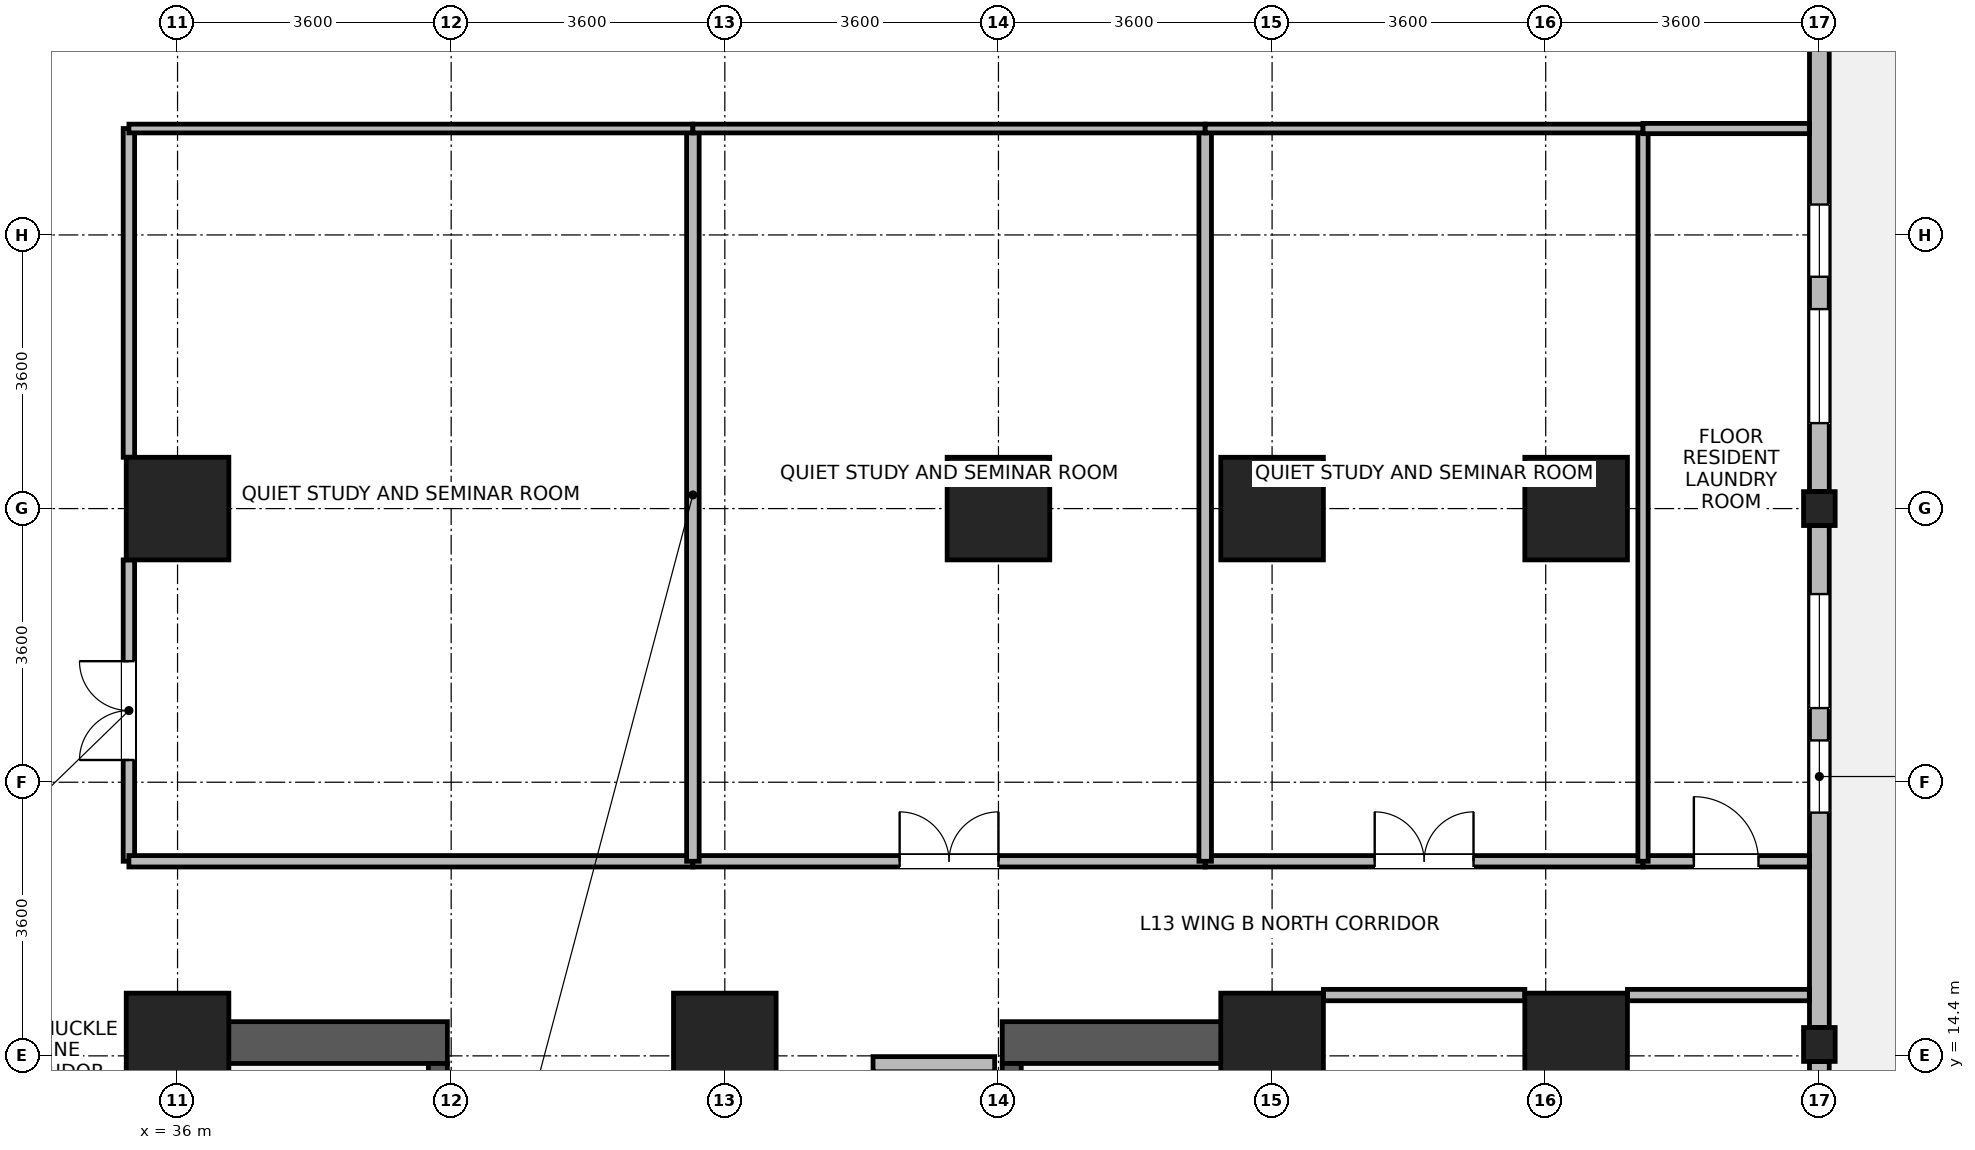
"""IFC4 building model, lengths in metres.
Left out: names, types, materials, properties, quantities, classifications, styles, units other than length and angle.
Written with IfcOpenShell. Run it as: python <this file> out.ifc"""

import sys

from ifc_helpers import new_model, si_unit, direction, frame, frame_2d, origin, origin_2d, place, context, subcontext, project, spatial, rectangle, i_section, extrude, source, transform, mapped, element, fill, save


model = new_model("IFC4")
c1 = context("Model", 3, precision=1e-05, world=origin(), true_north=direction((0.0, 1.0)))
c2 = subcontext(c1, "Body", "Model", "MODEL_VIEW")
j1 = project(units=[si_unit("LENGTHUNIT", "METRE"), si_unit("PLANEANGLEUNIT", "RADIAN")], contexts=[c1])
p1 = place(None, origin())
s1 = spatial("IfcSite", under=j1, at=p1, CompositionType="ELEMENT")
p2 = place(p1, origin())
s2 = spatial("IfcBuilding", under=s1, at=p2, CompositionType="ELEMENT")
p3 = place(p2, frame((0.0, 0.0, 54.9)))
s3 = spatial("IfcBuildingStorey", under=s2, at=p3, CompositionType="ELEMENT", Elevation=54.9)
for number, where, z_axis, x_axis in (
    (1, (36.075, 6.75, 0.0), (0.0, 0.0, 1.0), (0.0, 1.0, 0.0)),
    (2, (50.325, 6.75, 0.0), (0.0, 0.0, 1.0), (0.0, 1.0, 0.0)),
):
    element("IfcWall", number, at=place(p3, frame(where, z_axis=z_axis, x_axis=x_axis)), inside=s3, PredefinedType="SHEAR", context=c2, shape_type="SweptSolid", body=[
        extrude(rectangle(XDim=8.1, YDim=0.55, at=frame_2d((4.05, 0.0))), origin(), (0.0, 0.0, 1.0), 3.45),
    ])
for number, where, z_axis, x_axis in (
    (3, (36.35, 14.575, 0.0), (0.0, 0.0, 1.0), (1.0, 0.0, 0.0)),
    (4, (46.85, 14.575, 0.0), (0.0, 0.0, 1.0), (1.0, 0.0, 0.0)),
):
    element("IfcWall", number, at=place(p3, frame(where, z_axis=z_axis, x_axis=x_axis)), inside=s3, PredefinedType="SHEAR", context=c2, shape_type="SweptSolid", body=[
        extrude(rectangle(XDim=3.2, YDim=0.55, at=frame_2d((1.6, 0.0))), origin(), (0.0, 0.0, 1.0), 3.45),
    ])
p4 = place(p3, frame((39.425, 7.3, 0.0), z_axis=(0.0, 0.0, 1.0), x_axis=(0.0, 1.0, 0.0)))
e5 = element("IfcWall", 5, at=p4, inside=s3, PredefinedType="SHEAR", context=c2, shape_type="SweptSolid", body=[
    extrude(rectangle(XDim=7.0, YDim=0.25, at=frame_2d((3.5, 0.0))), origin(), (0.0, 0.0, 1.0), 3.45),
])
p5 = place(p4, frame((0.15, 0.0, 0.0)))
e6 = element("IfcOpeningElement", 6, at=p5, cuts=e5, PredefinedType="OPENING", context=c2, shape_type="SweptSolid", body=[
    extrude(rectangle(XDim=1.1, YDim=2.08, at=frame_2d((0.55, 1.04))), frame((0.0, 0.135, 0.0), z_axis=(0.0, -1.0, 0.0), x_axis=(1.0, 0.0, 0.0)), (0.0, 0.0, 1.0), 0.27),
])
p6 = place(p3, frame((46.975, 7.3, 0.0), z_axis=(0.0, 0.0, 1.0), x_axis=(0.0, 1.0, 0.0)))
e7 = element("IfcWall", 7, at=p6, inside=s3, PredefinedType="SHEAR", context=c2, shape_type="SweptSolid", body=[
    extrude(rectangle(XDim=7.0, YDim=0.25, at=frame_2d((3.5, 0.0))), origin(), (0.0, 0.0, 1.0), 3.45),
])
p7 = place(p6, frame((0.15, 0.0, 0.0)))
e8 = element("IfcOpeningElement", 8, at=p7, cuts=e7, PredefinedType="OPENING", context=c2, shape_type="SweptSolid", body=[
    extrude(rectangle(XDim=1.1, YDim=2.08, at=frame_2d((0.55, 1.04))), frame((0.0, 0.135, 0.0), z_axis=(0.0, -1.0, 0.0), x_axis=(1.0, 0.0, 0.0)), (0.0, 0.0, 1.0), 0.27),
])
m1 = source(origin(), c2, "Body", "SweptSolid", [
    extrude(rectangle(XDim=1.35, YDim=1.35, at=origin_2d()), origin(), (0.0, 0.0, 1.0), 3.7),
])
for number, where, z_axis, x_axis in (
    (9, (36.0, 21.6, 0.0), (0.0, 0.0, 1.0), (1.0, 0.0, 0.0)),
    (10, (46.8, 21.6, 0.0), (0.0, 0.0, 1.0), (1.0, 0.0, 0.0)),
    (11, (36.0, 14.55, 0.0), (0.0, 0.0, 1.0), (1.0, 0.0, 0.0)),
    (12, (43.2, 14.55, 0.0), (0.0, 0.0, 1.0), (1.0, 0.0, 0.0)),
    (13, (50.4, 14.55, 0.0), (0.0, 0.0, 1.0), (1.0, 0.0, 0.0)),
    (14, (50.4, 21.6, 0.0), (0.0, 0.0, 1.0), (1.0, 0.0, 0.0)),
    (15, (54.4, 14.55, 0.0), (0.0, 0.0, 1.0), (1.0, 0.0, 0.0)),
    (16, (54.4, 21.6, 0.0), (0.0, 0.0, 1.0), (1.0, 0.0, 0.0)),
):
    element("IfcColumn", number, at=place(p3, frame(where, z_axis=z_axis, x_axis=x_axis)), inside=s3, PredefinedType="COLUMN", context=c2, shape_type="MappedRepresentation", body=[
        mapped(m1, transform((0.0, 0.0, 0.0), x_axis=(1.0, 0.0, 0.0), y_axis=(0.0, 1.0, 0.0), z_axis=(0.0, 0.0, 1.0), scale=1.0)),
    ])
m2 = source(origin(), c2, "Body", "SweptSolid", [
    extrude(i_section(OverallWidth=0.416, OverallDepth=0.446, WebThickness=0.029, FlangeThickness=0.04, FilletRadius=0.015, at=origin_2d()), origin(), (0.0, 0.0, 1.0), 3.7),
])
for number, where, z_axis, x_axis in (
    (17, (57.6, 14.55, 0.0), (0.0, 0.0, 1.0), (1.0, 0.0, 0.0)),
    (18, (57.6, 21.6, 0.0), (0.0, 0.0, 1.0), (1.0, 0.0, 0.0)),
):
    element("IfcColumn", number, at=place(p3, frame(where, z_axis=z_axis, x_axis=x_axis)), inside=s3, PredefinedType="COLUMN", context=c2, shape_type="MappedRepresentation", body=[
        mapped(m2, transform((0.0, 0.0, 0.0), x_axis=(1.0, 0.0, 0.0), y_axis=(0.0, 1.0, 0.0), z_axis=(0.0, 0.0, 1.0), scale=1.0)),
    ])
p8 = place(p3, frame((57.6, 14.326, 0.0), z_axis=(0.0, 0.0, 1.0), x_axis=(0.0, -1.0, 0.0)))
e19 = element("IfcWall", 19, at=p8, inside=s3, PredefinedType="STANDARD", context=c2, shape_type="SweptSolid", body=[
    extrude(rectangle(XDim=7.052, YDim=0.26, at=frame_2d((3.526, 0.0))), origin(), (0.0, 0.0, 1.0), 2.93),
])
p9 = place(p8, frame((2.776, 0.0, 0.0)))
e20 = element("IfcOpeningElement", 20, at=p9, cuts=e19, PredefinedType="OPENING", context=c2, shape_type="SweptSolid", body=[
    extrude(rectangle(XDim=1.5, YDim=2.15, at=frame_2d((0.75, 1.075))), frame((0.0, 0.14, 0.0), z_axis=(0.0, -1.0, 0.0), x_axis=(1.0, 0.0, 0.0)), (0.0, 0.0, 1.0), 0.28),
])
p10 = place(p8, frame((1.013, 0.0, 0.85)))
e21 = element("IfcOpeningElement", 21, at=p10, cuts=e19, PredefinedType="OPENING", context=c2, shape_type="SweptSolid", body=[
    extrude(rectangle(XDim=1.5, YDim=1.85, at=frame_2d((0.75, 0.925))), frame((0.0, 0.14, 0.0), z_axis=(0.0, -1.0, 0.0), x_axis=(1.0, 0.0, 0.0)), (0.0, 0.0, 1.0), 0.28),
])
p11 = place(p8, frame((4.539, 0.0, 0.85)))
e22 = element("IfcOpeningElement", 22, at=p11, cuts=e19, PredefinedType="OPENING", context=c2, shape_type="SweptSolid", body=[
    extrude(rectangle(XDim=1.5, YDim=1.85, at=frame_2d((0.75, 0.925))), frame((0.0, 0.14, 0.0), z_axis=(0.0, -1.0, 0.0), x_axis=(1.0, 0.0, 0.0)), (0.0, 0.0, 1.0), 0.28),
])
p12 = place(p3, frame((57.6, 21.376, 0.0), z_axis=(0.0, 0.0, 1.0), x_axis=(0.0, -1.0, 0.0)))
e23 = element("IfcWall", 23, at=p12, inside=s3, PredefinedType="STANDARD", context=c2, shape_type="SweptSolid", body=[
    extrude(rectangle(XDim=6.602, YDim=0.26, at=frame_2d((3.301, 0.0))), origin(), (0.0, 0.0, 1.0), 2.93),
])
p13 = place(p12, frame((0.9, 0.0, 0.85)))
e24 = element("IfcOpeningElement", 24, at=p13, cuts=e23, PredefinedType="OPENING", context=c2, shape_type="SweptSolid", body=[
    extrude(rectangle(XDim=1.5, YDim=1.85, at=frame_2d((0.75, 0.925))), frame((0.0, 0.14, 0.0), z_axis=(0.0, -1.0, 0.0), x_axis=(1.0, 0.0, 0.0)), (0.0, 0.0, 1.0), 0.28),
])
p14 = place(p12, frame((2.826, 0.0, 0.85)))
e25 = element("IfcOpeningElement", 25, at=p14, cuts=e23, PredefinedType="OPENING", context=c2, shape_type="SweptSolid", body=[
    extrude(rectangle(XDim=0.95, YDim=1.75, at=frame_2d((0.475, 0.875))), frame((0.0, 0.14, 0.0), z_axis=(0.0, -1.0, 0.0), x_axis=(1.0, 0.0, 0.0)), (0.0, 0.0, 1.0), 0.28),
])
p15 = place(p3, frame((57.6, 28.426, 0.0), z_axis=(0.0, 0.0, 1.0), x_axis=(0.0, -1.0, 0.0)))
e26 = element("IfcWall", 26, at=p15, inside=s3, PredefinedType="STANDARD", context=c2, shape_type="SweptSolid", body=[
    extrude(rectangle(XDim=6.602, YDim=0.26, at=frame_2d((3.301, 0.0))), origin(), (0.0, 0.0, 1.0), 2.93),
])
p16 = place(p15, frame((4.201, 0.0, 0.85)))
e27 = element("IfcOpeningElement", 27, at=p16, cuts=e26, PredefinedType="OPENING", context=c2, shape_type="SweptSolid", body=[
    extrude(rectangle(XDim=1.5, YDim=1.85, at=frame_2d((0.75, 0.925))), frame((0.0, 0.14, 0.0), z_axis=(0.0, -1.0, 0.0), x_axis=(1.0, 0.0, 0.0)), (0.0, 0.0, 1.0), 0.28),
])
p17 = place(p15, frame((2.826, 0.0, 0.85)))
e28 = element("IfcOpeningElement", 28, at=p17, cuts=e26, PredefinedType="OPENING", context=c2, shape_type="SweptSolid", body=[
    extrude(rectangle(XDim=0.95, YDim=1.75, at=frame_2d((0.475, 0.875))), frame((0.0, 0.14, 0.0), z_axis=(0.0, -1.0, 0.0), x_axis=(1.0, 0.0, 0.0)), (0.0, 0.0, 1.0), 0.28),
])
p18 = place(p3, frame((45.15, 14.29, 0.0), z_axis=(0.0, 0.0, 1.0), x_axis=(1.0, 0.0, 0.0)))
e29 = element("IfcWall", 29, at=p18, inside=s3, PredefinedType="PARTITIONING", context=c2, shape_type="SweptSolid", body=[
    extrude(rectangle(XDim=1.6, YDim=0.2, at=frame_2d((0.8, 0.0))), origin(), (0.0, 0.0, 1.0), 2.23),
])
p19 = place(p3, frame((35.36, 16.96, 0.0), z_axis=(0.0, 0.0, 1.0), x_axis=(0.0, 1.0, 0.0)))
e30 = element("IfcWall", 30, at=p19, inside=s3, PredefinedType="PARTITIONING", context=c2, shape_type="SweptSolid", body=[
    extrude(rectangle(XDim=3.965, YDim=0.15, at=frame_2d((1.982, 0.0))), origin(), (0.0, 0.0, 1.0), 3.43),
])
p20 = place(p19, frame((1.333, 0.0, 0.0)))
e31 = element("IfcOpeningElement", 31, at=p20, cuts=e30, PredefinedType="OPENING", context=c2, shape_type="SweptSolid", body=[
    extrude(rectangle(XDim=1.3, YDim=2.12, at=frame_2d((0.65, 1.06))), frame((0.0, 0.085, 0.0), z_axis=(0.0, -1.0, 0.0), x_axis=(1.0, 0.0, 0.0)), (0.0, 0.0, 1.0), 0.17),
])
p21 = place(p3, frame((35.36, 22.275, 0.0), z_axis=(0.0, 0.0, 1.0), x_axis=(0.0, 1.0, 0.0)))
e32 = element("IfcWall", 32, at=p21, inside=s3, PredefinedType="PARTITIONING", context=c2, shape_type="SweptSolid", body=[
    extrude(rectangle(XDim=4.325, YDim=0.15, at=frame_2d((2.163, 0.0))), origin(), (0.0, 0.0, 1.0), 3.43),
])
p22 = place(p3, frame((35.36, 16.96, 0.0), z_axis=(0.0, 0.0, 1.0), x_axis=(1.0, 0.0, 0.0)))
e33 = element("IfcWall", 33, at=p22, inside=s3, PredefinedType="PARTITIONING", context=c2, shape_type="SweptSolid", body=[
    extrude(rectangle(XDim=7.42, YDim=0.15, at=frame_2d((3.71, 0.0))), origin(), (0.0, 0.0, 1.0), 3.43),
])
p23 = place(p3, frame((51.075, 15.2, 0.0), z_axis=(0.0, 0.0, 1.0), x_axis=(1.0, 0.0, 0.0)))
e34 = element("IfcWall", 34, at=p23, inside=s3, PredefinedType="PARTITIONING", context=c2, shape_type="SweptSolid", body=[
    extrude(rectangle(XDim=2.65, YDim=0.15, at=frame_2d((1.325, 0.0))), origin(), (0.0, 0.0, 1.0), 3.43),
])
p24 = place(p3, frame((55.075, 15.2, 0.0), z_axis=(0.0, 0.0, 1.0), x_axis=(1.0, 0.0, 0.0)))
e35 = element("IfcWall", 35, at=p24, inside=s3, PredefinedType="PARTITIONING", context=c2, shape_type="SweptSolid", body=[
    extrude(rectangle(XDim=2.393, YDim=0.15, at=frame_2d((1.197, 0.0))), origin(), (0.0, 0.0, 1.0), 3.43),
])
p25 = place(p3, frame((42.78, 16.96, 0.0), z_axis=(0.0, 0.0, 1.0), x_axis=(1.0, 0.0, 0.0)))
e36 = element("IfcWall", 36, at=p25, inside=s3, PredefinedType="PARTITIONING", context=c2, shape_type="SweptSolid", body=[
    extrude(rectangle(XDim=6.74, YDim=0.15, at=frame_2d((3.37, 0.0))), origin(), (0.0, 0.0, 1.0), 3.43),
])
p26 = place(p25, frame((2.72, 0.0, 0.0)))
e37 = element("IfcOpeningElement", 37, at=p26, cuts=e36, PredefinedType="OPENING", context=c2, shape_type="SweptSolid", body=[
    extrude(rectangle(XDim=1.3, YDim=2.12, at=frame_2d((0.65, 1.06))), frame((0.0, 0.085, 0.0), z_axis=(0.0, -1.0, 0.0), x_axis=(1.0, 0.0, 0.0)), (0.0, 0.0, 1.0), 0.17),
])
p27 = place(p3, frame((49.52, 16.96, 0.0), z_axis=(0.0, 0.0, 1.0), x_axis=(1.0, 0.0, 0.0)))
e38 = element("IfcWall", 38, at=p27, inside=s3, PredefinedType="PARTITIONING", context=c2, shape_type="SweptSolid", body=[
    extrude(rectangle(XDim=5.76, YDim=0.15, at=frame_2d((2.88, 0.0))), origin(), (0.0, 0.0, 1.0), 3.43),
])
p28 = place(p27, frame((2.23, 0.0, 0.0)))
e39 = element("IfcOpeningElement", 39, at=p28, cuts=e38, PredefinedType="OPENING", context=c2, shape_type="SweptSolid", body=[
    extrude(rectangle(XDim=1.3, YDim=2.12, at=frame_2d((0.65, 1.06))), frame((0.0, 0.085, 0.0), z_axis=(0.0, -1.0, 0.0), x_axis=(1.0, 0.0, 0.0)), (0.0, 0.0, 1.0), 0.17),
])
p29 = place(p3, frame((55.28, 16.96, 0.0), z_axis=(0.0, 0.0, 1.0), x_axis=(1.0, 0.0, 0.0)))
e40 = element("IfcWall", 40, at=p29, inside=s3, PredefinedType="PARTITIONING", context=c2, shape_type="SweptSolid", body=[
    extrude(rectangle(XDim=2.188, YDim=0.15, at=frame_2d((1.094, 0.0))), origin(), (0.0, 0.0, 1.0), 3.43),
])
p30 = place(p29, frame((0.669, 0.0, 0.0)))
e41 = element("IfcOpeningElement", 41, at=p30, cuts=e40, PredefinedType="OPENING", context=c2, shape_type="SweptSolid", body=[
    extrude(rectangle(XDim=0.85, YDim=2.04, at=frame_2d((0.425, 1.02))), frame((0.0, 0.085, 0.0), z_axis=(0.0, -1.0, 0.0), x_axis=(1.0, 0.0, 0.0)), (0.0, 0.0, 1.0), 0.17),
])
for number, where, z_axis, x_axis in (
    (42, (42.78, 16.96, 0.0), (0.0, 0.0, 1.0), (0.0, 1.0, 0.0)),
    (43, (49.52, 16.96, 0.0), (0.0, 0.0, 1.0), (0.0, 1.0, 0.0)),
):
    element("IfcWall", number, at=place(p3, frame(where, z_axis=z_axis, x_axis=x_axis)), inside=s3, PredefinedType="PARTITIONING", context=c2, shape_type="SweptSolid", body=[
        extrude(rectangle(XDim=9.64, YDim=0.165, at=frame_2d((4.82, 0.0))), origin(), (0.0, 0.0, 1.0), 3.43),
    ])
p31 = place(p3, frame((55.28, 16.96, 0.0), z_axis=(0.0, 0.0, 1.0), x_axis=(0.0, 1.0, 0.0)))
e44 = element("IfcWall", 44, at=p31, inside=s3, PredefinedType="PARTITIONING", context=c2, shape_type="SweptSolid", body=[
    extrude(rectangle(XDim=9.64, YDim=0.135, at=frame_2d((4.82, 0.0))), origin(), (0.0, 0.0, 1.0), 3.43),
])
p32 = place(p3, frame((35.36, 26.6, 0.0), z_axis=(0.0, 0.0, 1.0), x_axis=(1.0, 0.0, 0.0)))
e45 = element("IfcWall", 45, at=p32, inside=s3, PredefinedType="PARTITIONING", context=c2, shape_type="SweptSolid", body=[
    extrude(rectangle(XDim=7.42, YDim=0.115, at=frame_2d((3.71, 0.0))), origin(), (0.0, 0.0, 1.0), 3.43),
])
p33 = place(p3, frame((42.78, 26.6, 0.0), z_axis=(0.0, 0.0, 1.0), x_axis=(1.0, 0.0, 0.0)))
e46 = element("IfcWall", 46, at=p33, inside=s3, PredefinedType="PARTITIONING", context=c2, shape_type="SweptSolid", body=[
    extrude(rectangle(XDim=6.74, YDim=0.115, at=frame_2d((3.37, 0.0))), origin(), (0.0, 0.0, 1.0), 3.43),
])
p34 = place(p3, frame((49.52, 26.6, 0.0), z_axis=(0.0, 0.0, 1.0), x_axis=(1.0, 0.0, 0.0)))
e47 = element("IfcWall", 47, at=p34, inside=s3, PredefinedType="PARTITIONING", context=c2, shape_type="SweptSolid", body=[
    extrude(rectangle(XDim=5.76, YDim=0.115, at=frame_2d((2.88, 0.0))), origin(), (0.0, 0.0, 1.0), 3.43),
])
p35 = place(p3, frame((55.28, 26.6, 0.0), z_axis=(0.0, 0.0, 1.0), x_axis=(1.0, 0.0, 0.0)))
e48 = element("IfcWall", 48, at=p35, inside=s3, PredefinedType="PARTITIONING", context=c2, shape_type="SweptSolid", body=[
    extrude(rectangle(XDim=2.188, YDim=0.135, at=frame_2d((1.094, 0.0))), origin(), (0.0, 0.0, 1.0), 3.43),
])
p36 = place(p13, origin())
e49 = element("IfcWindow", 49, at=p36, inside=s3, PartitioningType="SINGLE_PANEL", PredefinedType="WINDOW", context=c2, shape_type="SweptSolid", body=[
    extrude(rectangle(XDim=1.5, YDim=1.85, at=frame_2d((0.75, 0.925))), frame((0.0, 0.03, 0.0), z_axis=(0.0, -1.0, 0.0), x_axis=(1.0, 0.0, 0.0)), (0.0, 0.0, 1.0), 0.06),
])
fill(e24, e49)
p37 = place(p14, origin())
e50 = element("IfcWindow", 50, at=p37, inside=s3, PartitioningType="SINGLE_PANEL", PredefinedType="WINDOW", context=c2, shape_type="SweptSolid", body=[
    extrude(rectangle(XDim=0.95, YDim=1.75, at=frame_2d((0.475, 0.875))), frame((0.0, 0.03, 0.0), z_axis=(0.0, -1.0, 0.0), x_axis=(1.0, 0.0, 0.0)), (0.0, 0.0, 1.0), 0.06),
])
fill(e25, e50)
p38 = place(p16, origin())
e51 = element("IfcWindow", 51, at=p38, inside=s3, PartitioningType="SINGLE_PANEL", PredefinedType="WINDOW", context=c2, shape_type="SweptSolid", body=[
    extrude(rectangle(XDim=1.5, YDim=1.85, at=frame_2d((0.75, 0.925))), frame((0.0, 0.03, 0.0), z_axis=(0.0, -1.0, 0.0), x_axis=(1.0, 0.0, 0.0)), (0.0, 0.0, 1.0), 0.06),
])
fill(e27, e51)
p39 = place(p17, origin())
e52 = element("IfcWindow", 52, at=p39, inside=s3, PartitioningType="SINGLE_PANEL", PredefinedType="WINDOW", context=c2, shape_type="SweptSolid", body=[
    extrude(rectangle(XDim=0.95, YDim=1.75, at=frame_2d((0.475, 0.875))), frame((0.0, 0.03, 0.0), z_axis=(0.0, -1.0, 0.0), x_axis=(1.0, 0.0, 0.0)), (0.0, 0.0, 1.0), 0.06),
])
fill(e28, e52)
p40 = place(p20, origin())
e53 = element("IfcDoor", 53, at=p40, inside=s3, OperationType="DOUBLE_DOOR_SINGLE_SWING", PredefinedType="DOOR", context=c2, shape_type="SweptSolid", body=[
    extrude(rectangle(XDim=1.3, YDim=2.12, at=frame_2d((0.65, 1.06))), frame((0.0, 0.025, 0.0), z_axis=(0.0, -1.0, 0.0), x_axis=(1.0, 0.0, 0.0)), (0.0, 0.0, 1.0), 0.05),
])
fill(e31, e53)
p41 = place(p26, origin())
e54 = element("IfcDoor", 54, at=p41, inside=s3, OperationType="DOUBLE_DOOR_SINGLE_SWING", PredefinedType="DOOR", context=c2, shape_type="SweptSolid", body=[
    extrude(rectangle(XDim=1.3, YDim=2.12, at=frame_2d((0.65, 1.06))), frame((0.0, 0.025, 0.0), z_axis=(0.0, -1.0, 0.0), x_axis=(1.0, 0.0, 0.0)), (0.0, 0.0, 1.0), 0.05),
])
fill(e37, e54)
p42 = place(p28, origin())
e55 = element("IfcDoor", 55, at=p42, inside=s3, OperationType="DOUBLE_DOOR_SINGLE_SWING", PredefinedType="DOOR", context=c2, shape_type="SweptSolid", body=[
    extrude(rectangle(XDim=1.3, YDim=2.12, at=frame_2d((0.65, 1.06))), frame((0.0, 0.025, 0.0), z_axis=(0.0, -1.0, 0.0), x_axis=(1.0, 0.0, 0.0)), (0.0, 0.0, 1.0), 0.05),
])
fill(e39, e55)
p43 = place(p30, origin())
e56 = element("IfcDoor", 56, at=p43, inside=s3, OperationType="SINGLE_SWING_LEFT", PredefinedType="DOOR", context=c2, shape_type="SweptSolid", body=[
    extrude(rectangle(XDim=0.85, YDim=2.04, at=frame_2d((0.425, 1.02))), frame((0.0, 0.025, 0.0), z_axis=(0.0, -1.0, 0.0), x_axis=(1.0, 0.0, 0.0)), (0.0, 0.0, 1.0), 0.05),
])
fill(e41, e56)
save(model, sys.argv[1])
